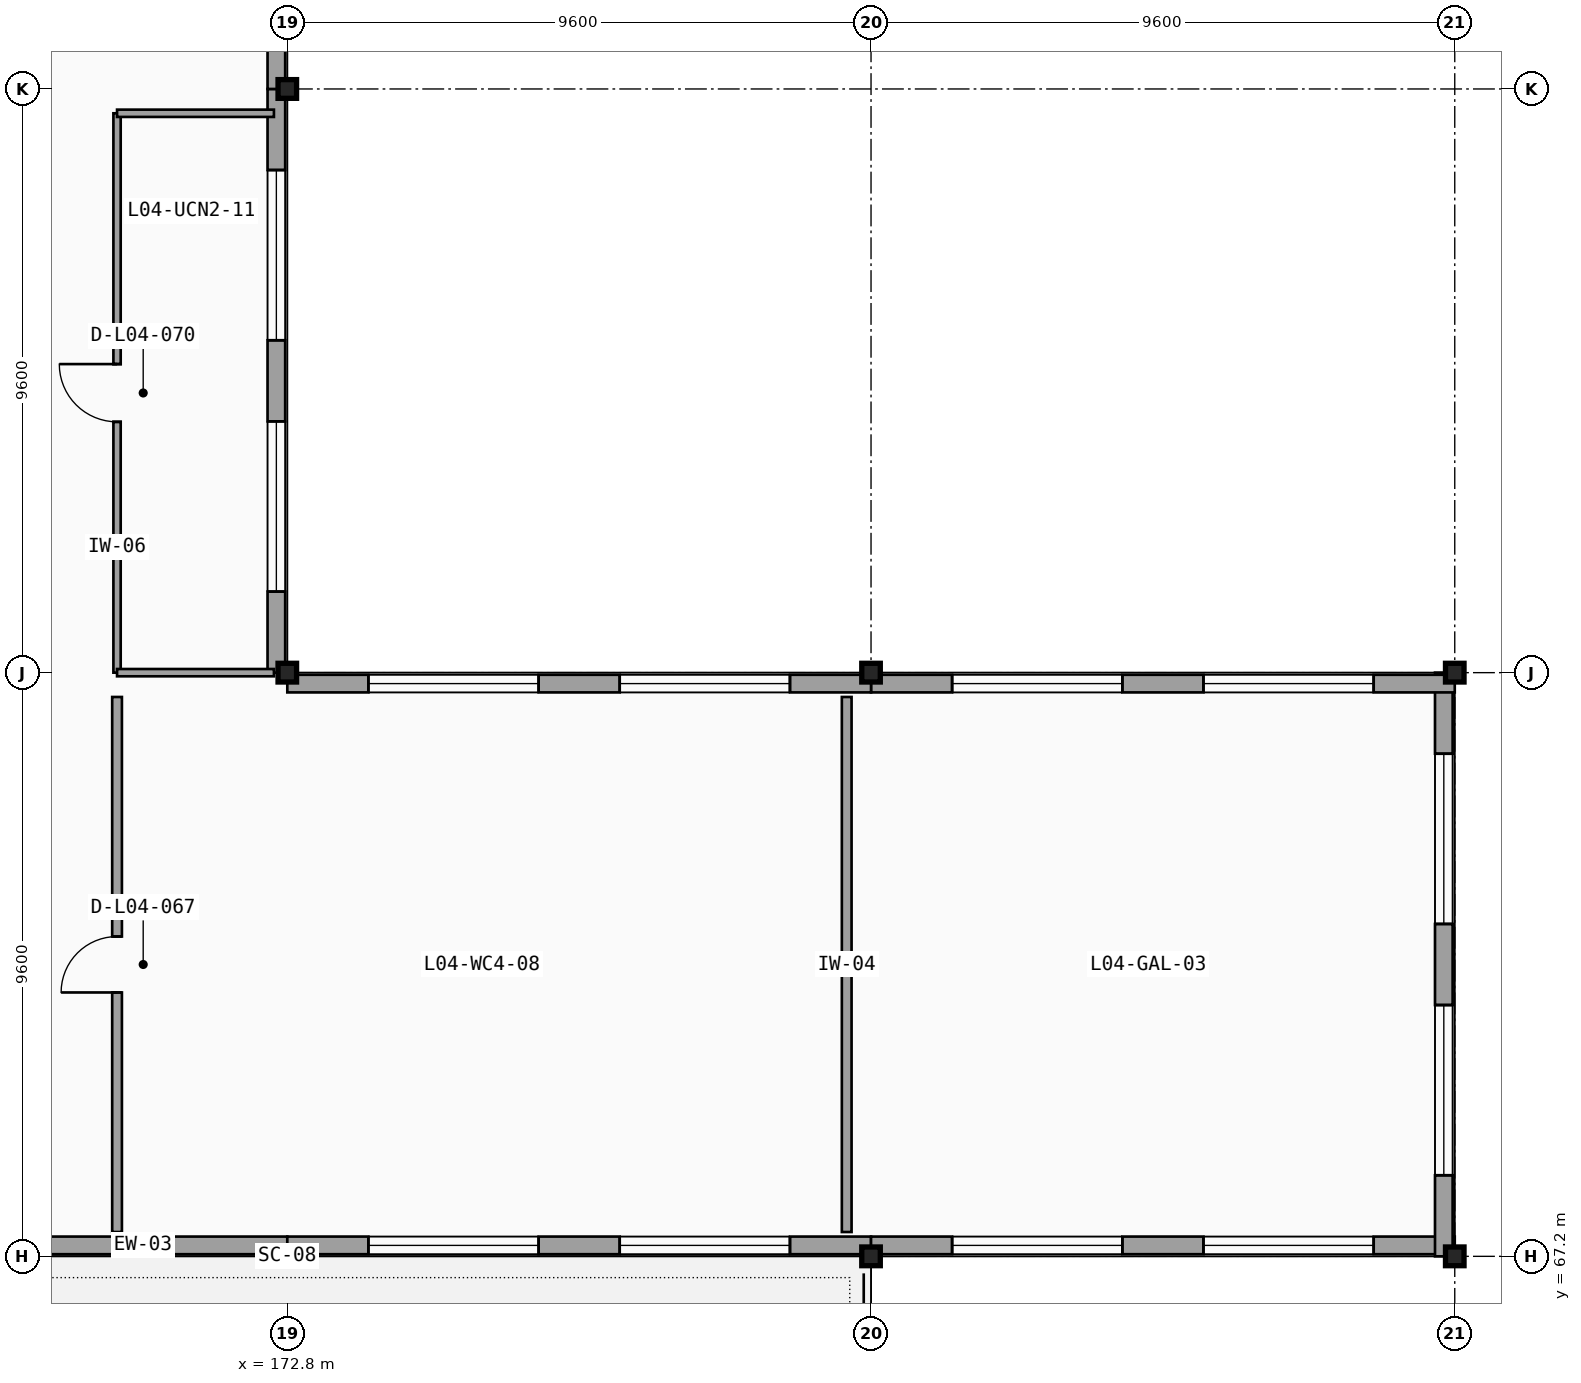
"""IFC4 building model, lengths in metres.
Left out: names, types, materials, properties, quantities, classifications, styles, units other than length and angle.
Written with IfcOpenShell. Run it as: python <this file> out.ifc"""

import sys

from ifc_helpers import new_model, si_unit, direction, frame, frame_2d, origin, origin_2d, place, context, subcontext, project, spatial, rectangle, i_section, extrude, element, fill, save


model = new_model("IFC4")
c1 = context("Model", 3, precision=1e-05, world=origin(), true_north=direction((0.0, 1.0)))
c2 = subcontext(c1, "Body", "Model", "MODEL_VIEW")
j1 = project(units=[si_unit("LENGTHUNIT", "METRE"), si_unit("PLANEANGLEUNIT", "RADIAN")], contexts=[c1])
p1 = place(None, origin())
s1 = spatial("IfcSite", under=j1, at=p1, CompositionType="ELEMENT")
p2 = place(p1, origin())
s2 = spatial("IfcBuilding", under=s1, at=p2, CompositionType="ELEMENT")
p3 = place(p2, frame((0.0, 0.0, 18.6)))
s3 = spatial("IfcBuildingStorey", under=s2, at=p3, CompositionType="ELEMENT", Elevation=18.6)
for number, where, z_axis, x_axis in (
    (1, (172.8, 67.2, 0.0), (0.0, 0.0, 1.0), (1.0, 0.0, 0.0)),
    (2, (172.8, 76.8, 0.0), (0.0, 0.0, 1.0), (1.0, 0.0, 0.0)),
    (3, (172.8, 86.4, 0.0), (0.0, 0.0, 1.0), (1.0, 0.0, 0.0)),
    (4, (182.4, 67.2, 0.0), (0.0, 0.0, 1.0), (1.0, 0.0, 0.0)),
    (5, (182.4, 76.8, 0.0), (0.0, 0.0, 1.0), (1.0, 0.0, 0.0)),
    (6, (192.0, 67.2, 0.0), (0.0, 0.0, 1.0), (1.0, 0.0, 0.0)),
    (7, (192.0, 76.8, 0.0), (0.0, 0.0, 1.0), (1.0, 0.0, 0.0)),
):
    element("IfcColumn", number, at=place(p3, frame(where, z_axis=z_axis, x_axis=x_axis)), inside=s3, PredefinedType="COLUMN", context=c2, shape_type="SweptSolid", body=[
        extrude(i_section(OverallWidth=0.305, OverallDepth=0.308, WebThickness=0.01, FlangeThickness=0.015, FilletRadius=0.013, at=origin_2d()), origin(), (0.0, 0.0, 1.0), 4.5),
    ])
p4 = place(p3, frame((164.28, 67.38, 0.0), z_axis=(0.0, 0.0, 1.0), x_axis=(1.0, 0.0, 0.0)))
e8 = element("IfcWall", 8, at=p4, inside=s3, PredefinedType="SOLIDWALL", context=c2, shape_type="SweptSolid", body=[
    extrude(rectangle(XDim=8.52, YDim=0.29, at=frame_2d((4.26, 0.0))), origin(), (0.0, 0.0, 1.0), 3.562),
])
p5 = place(p4, frame((3.773, 0.0, 0.95), z_axis=(0.0, 0.0, 1.0), x_axis=(-1.0, 0.0, 0.0)))
e9 = element("IfcOpeningElement", 9, at=p5, cuts=e8, PredefinedType="OPENING", context=c2, shape_type="SweptSolid", body=[
    extrude(rectangle(XDim=2.8, YDim=1.9, at=frame_2d((1.4, 0.95))), frame((0.0, 0.155, 0.0), z_axis=(0.0, -1.0, 0.0), x_axis=(1.0, 0.0, 0.0)), (0.0, 0.0, 1.0), 0.31),
])
p6 = place(p3, frame((172.8, 67.38, 0.0), z_axis=(0.0, 0.0, 1.0), x_axis=(1.0, 0.0, 0.0)))
e10 = element("IfcWall", 10, at=p6, inside=s3, PredefinedType="SOLIDWALL", context=c2, shape_type="SweptSolid", body=[
    extrude(rectangle(XDim=9.6, YDim=0.29, at=frame_2d((4.8, 0.0))), origin(), (0.0, 0.0, 1.0), 3.562),
])
p7 = place(p6, frame((4.133, 0.0, 0.95), z_axis=(0.0, 0.0, 1.0), x_axis=(-1.0, 0.0, 0.0)))
e11 = element("IfcOpeningElement", 11, at=p7, cuts=e10, PredefinedType="OPENING", context=c2, shape_type="SweptSolid", body=[
    extrude(rectangle(XDim=2.8, YDim=1.9, at=frame_2d((1.4, 0.95))), frame((0.0, 0.155, 0.0), z_axis=(0.0, -1.0, 0.0), x_axis=(1.0, 0.0, 0.0)), (0.0, 0.0, 1.0), 0.31),
])
p8 = place(p6, frame((8.267, 0.0, 0.95), z_axis=(0.0, 0.0, 1.0), x_axis=(-1.0, 0.0, 0.0)))
e12 = element("IfcOpeningElement", 12, at=p8, cuts=e10, PredefinedType="OPENING", context=c2, shape_type="SweptSolid", body=[
    extrude(rectangle(XDim=2.8, YDim=1.9, at=frame_2d((1.4, 0.95))), frame((0.0, 0.155, 0.0), z_axis=(0.0, -1.0, 0.0), x_axis=(1.0, 0.0, 0.0)), (0.0, 0.0, 1.0), 0.31),
])
p9 = place(p3, frame((182.4, 67.38, 0.0), z_axis=(0.0, 0.0, 1.0), x_axis=(1.0, 0.0, 0.0)))
e13 = element("IfcWall", 13, at=p9, inside=s3, PredefinedType="SOLIDWALL", context=c2, shape_type="SweptSolid", body=[
    extrude(rectangle(XDim=9.6, YDim=0.29, at=frame_2d((4.8, 0.0))), origin(), (0.0, 0.0, 1.0), 3.313),
])
p10 = place(p9, frame((4.133, 0.0, 0.95), z_axis=(0.0, 0.0, 1.0), x_axis=(-1.0, 0.0, 0.0)))
e14 = element("IfcOpeningElement", 14, at=p10, cuts=e13, PredefinedType="OPENING", context=c2, shape_type="SweptSolid", body=[
    extrude(rectangle(XDim=2.8, YDim=1.9, at=frame_2d((1.4, 0.95))), frame((0.0, 0.155, 0.0), z_axis=(0.0, -1.0, 0.0), x_axis=(1.0, 0.0, 0.0)), (0.0, 0.0, 1.0), 0.31),
])
p11 = place(p9, frame((8.267, 0.0, 0.95), z_axis=(0.0, 0.0, 1.0), x_axis=(-1.0, 0.0, 0.0)))
e15 = element("IfcOpeningElement", 15, at=p11, cuts=e13, PredefinedType="OPENING", context=c2, shape_type="SweptSolid", body=[
    extrude(rectangle(XDim=2.8, YDim=1.9, at=frame_2d((1.4, 0.95))), frame((0.0, 0.155, 0.0), z_axis=(0.0, -1.0, 0.0), x_axis=(1.0, 0.0, 0.0)), (0.0, 0.0, 1.0), 0.31),
])
p12 = place(p3, frame((191.82, 67.2, 0.0), z_axis=(0.0, 0.0, 1.0), x_axis=(0.0, 1.0, 0.0)))
e16 = element("IfcWall", 16, at=p12, inside=s3, PredefinedType="SOLIDWALL", context=c2, shape_type="SweptSolid", body=[
    extrude(rectangle(XDim=9.6, YDim=0.29, at=frame_2d((4.8, 0.0))), origin(), (0.0, 0.0, 1.0), 3.313),
])
p13 = place(p12, frame((4.133, 0.0, 0.95), z_axis=(0.0, 0.0, 1.0), x_axis=(-1.0, 0.0, 0.0)))
e17 = element("IfcOpeningElement", 17, at=p13, cuts=e16, PredefinedType="OPENING", context=c2, shape_type="SweptSolid", body=[
    extrude(rectangle(XDim=2.8, YDim=1.9, at=frame_2d((1.4, 0.95))), frame((0.0, 0.155, 0.0), z_axis=(0.0, -1.0, 0.0), x_axis=(1.0, 0.0, 0.0)), (0.0, 0.0, 1.0), 0.31),
])
p14 = place(p12, frame((8.267, 0.0, 0.95), z_axis=(0.0, 0.0, 1.0), x_axis=(-1.0, 0.0, 0.0)))
e18 = element("IfcOpeningElement", 18, at=p14, cuts=e16, PredefinedType="OPENING", context=c2, shape_type="SweptSolid", body=[
    extrude(rectangle(XDim=2.8, YDim=1.9, at=frame_2d((1.4, 0.95))), frame((0.0, 0.155, 0.0), z_axis=(0.0, -1.0, 0.0), x_axis=(1.0, 0.0, 0.0)), (0.0, 0.0, 1.0), 0.31),
])
p15 = place(p3, frame((192.0, 76.62, 0.0), z_axis=(0.0, 0.0, 1.0), x_axis=(-1.0, 0.0, 0.0)))
e19 = element("IfcWall", 19, at=p15, inside=s3, PredefinedType="SOLIDWALL", context=c2, shape_type="SweptSolid", body=[
    extrude(rectangle(XDim=9.6, YDim=0.29, at=frame_2d((4.8, 0.0))), origin(), (0.0, 0.0, 1.0), 3.313),
])
p16 = place(p15, frame((4.133, 0.0, 0.95), z_axis=(0.0, 0.0, 1.0), x_axis=(-1.0, 0.0, 0.0)))
e20 = element("IfcOpeningElement", 20, at=p16, cuts=e19, PredefinedType="OPENING", context=c2, shape_type="SweptSolid", body=[
    extrude(rectangle(XDim=2.8, YDim=1.9, at=frame_2d((1.4, 0.95))), frame((0.0, 0.155, 0.0), z_axis=(0.0, -1.0, 0.0), x_axis=(1.0, 0.0, 0.0)), (0.0, 0.0, 1.0), 0.31),
])
p17 = place(p15, frame((8.267, 0.0, 0.95), z_axis=(0.0, 0.0, 1.0), x_axis=(-1.0, 0.0, 0.0)))
e21 = element("IfcOpeningElement", 21, at=p17, cuts=e19, PredefinedType="OPENING", context=c2, shape_type="SweptSolid", body=[
    extrude(rectangle(XDim=2.8, YDim=1.9, at=frame_2d((1.4, 0.95))), frame((0.0, 0.155, 0.0), z_axis=(0.0, -1.0, 0.0), x_axis=(1.0, 0.0, 0.0)), (0.0, 0.0, 1.0), 0.31),
])
p18 = place(p3, frame((182.4, 76.62, 0.0), z_axis=(0.0, 0.0, 1.0), x_axis=(-1.0, 0.0, 0.0)))
e22 = element("IfcWall", 22, at=p18, inside=s3, PredefinedType="SOLIDWALL", context=c2, shape_type="SweptSolid", body=[
    extrude(rectangle(XDim=9.6, YDim=0.29, at=frame_2d((4.8, 0.0))), origin(), (0.0, 0.0, 1.0), 3.562),
])
p19 = place(p18, frame((4.133, 0.0, 0.95), z_axis=(0.0, 0.0, 1.0), x_axis=(-1.0, 0.0, 0.0)))
e23 = element("IfcOpeningElement", 23, at=p19, cuts=e22, PredefinedType="OPENING", context=c2, shape_type="SweptSolid", body=[
    extrude(rectangle(XDim=2.8, YDim=1.9, at=frame_2d((1.4, 0.95))), frame((0.0, 0.155, 0.0), z_axis=(0.0, -1.0, 0.0), x_axis=(1.0, 0.0, 0.0)), (0.0, 0.0, 1.0), 0.31),
])
p20 = place(p18, frame((8.267, 0.0, 0.95), z_axis=(0.0, 0.0, 1.0), x_axis=(-1.0, 0.0, 0.0)))
e24 = element("IfcOpeningElement", 24, at=p20, cuts=e22, PredefinedType="OPENING", context=c2, shape_type="SweptSolid", body=[
    extrude(rectangle(XDim=2.8, YDim=1.9, at=frame_2d((1.4, 0.95))), frame((0.0, 0.155, 0.0), z_axis=(0.0, -1.0, 0.0), x_axis=(1.0, 0.0, 0.0)), (0.0, 0.0, 1.0), 0.31),
])
p21 = place(p3, frame((172.62, 76.8, 0.0), z_axis=(0.0, 0.0, 1.0), x_axis=(0.0, 1.0, 0.0)))
e25 = element("IfcWall", 25, at=p21, inside=s3, PredefinedType="SOLIDWALL", context=c2, shape_type="SweptSolid", body=[
    extrude(rectangle(XDim=9.6, YDim=0.29, at=frame_2d((4.8, 0.0))), origin(), (0.0, 0.0, 1.0), 3.562),
])
p22 = place(p21, frame((4.133, 0.0, 0.95), z_axis=(0.0, 0.0, 1.0), x_axis=(-1.0, 0.0, 0.0)))
e26 = element("IfcOpeningElement", 26, at=p22, cuts=e25, PredefinedType="OPENING", context=c2, shape_type="SweptSolid", body=[
    extrude(rectangle(XDim=2.8, YDim=1.9, at=frame_2d((1.4, 0.95))), frame((0.0, 0.155, 0.0), z_axis=(0.0, -1.0, 0.0), x_axis=(1.0, 0.0, 0.0)), (0.0, 0.0, 1.0), 0.31),
])
p23 = place(p21, frame((8.267, 0.0, 0.95), z_axis=(0.0, 0.0, 1.0), x_axis=(-1.0, 0.0, 0.0)))
e27 = element("IfcOpeningElement", 27, at=p23, cuts=e25, PredefinedType="OPENING", context=c2, shape_type="SweptSolid", body=[
    extrude(rectangle(XDim=2.8, YDim=1.9, at=frame_2d((1.4, 0.95))), frame((0.0, 0.155, 0.0), z_axis=(0.0, -1.0, 0.0), x_axis=(1.0, 0.0, 0.0)), (0.0, 0.0, 1.0), 0.31),
])
p24 = place(p3, frame((172.62, 86.4, 0.0), z_axis=(0.0, 0.0, 1.0), x_axis=(0.0, 1.0, 0.0)))
e28 = element("IfcWall", 28, at=p24, inside=s3, PredefinedType="SOLIDWALL", context=c2, shape_type="SweptSolid", body=[
    extrude(rectangle(XDim=9.6, YDim=0.29, at=frame_2d((4.8, 0.0))), origin(), (0.0, 0.0, 1.0), 3.562),
])
p25 = place(p24, frame((4.133, 0.0, 0.95), z_axis=(0.0, 0.0, 1.0), x_axis=(-1.0, 0.0, 0.0)))
e29 = element("IfcOpeningElement", 29, at=p25, cuts=e28, PredefinedType="OPENING", context=c2, shape_type="SweptSolid", body=[
    extrude(rectangle(XDim=2.8, YDim=1.9, at=frame_2d((1.4, 0.95))), frame((0.0, 0.155, 0.0), z_axis=(0.0, -1.0, 0.0), x_axis=(1.0, 0.0, 0.0)), (0.0, 0.0, 1.0), 0.31),
])
p26 = place(p24, frame((8.267, 0.0, 0.95), z_axis=(0.0, 0.0, 1.0), x_axis=(-1.0, 0.0, 0.0)))
e30 = element("IfcOpeningElement", 30, at=p26, cuts=e28, PredefinedType="OPENING", context=c2, shape_type="SweptSolid", body=[
    extrude(rectangle(XDim=2.8, YDim=1.9, at=frame_2d((1.4, 0.95))), frame((0.0, 0.155, 0.0), z_axis=(0.0, -1.0, 0.0), x_axis=(1.0, 0.0, 0.0)), (0.0, 0.0, 1.0), 0.31),
])
p27 = place(p3, frame((182.0, 76.4, 0.0), z_axis=(0.0, 0.0, 1.0), x_axis=(0.0, -1.0, 0.0)))
e31 = element("IfcWall", 31, at=p27, inside=s3, PredefinedType="PARTITIONING", context=c2, shape_type="SweptSolid", body=[
    extrude(rectangle(XDim=8.8, YDim=0.16, at=frame_2d((4.4, 0.0))), origin(), (0.0, 0.0, 1.0), 3.836),
])
p28 = place(p3, frame((170.0, 67.6, 0.0), z_axis=(0.0, 0.0, 1.0), x_axis=(0.0, 1.0, 0.0)))
e32 = element("IfcWall", 32, at=p28, inside=s3, PredefinedType="PARTITIONING", context=c2, shape_type="SweptSolid", body=[
    extrude(rectangle(XDim=8.8, YDim=0.16, at=frame_2d((4.4, 0.0))), origin(), (0.0, 0.0, 1.0), 3.836),
])
p29 = place(p28, frame((3.94, 0.0, 0.0), z_axis=(0.0, 0.0, 1.0), x_axis=(1.0, 0.0, 0.0)))
e33 = element("IfcOpeningElement", 33, at=p29, cuts=e32, PredefinedType="OPENING", context=c2, shape_type="SweptSolid", body=[
    extrude(rectangle(XDim=0.92, YDim=2.12, at=frame_2d((0.46, 1.06))), frame((0.0, 0.09, 0.0), z_axis=(0.0, -1.0, 0.0), x_axis=(1.0, 0.0, 0.0)), (0.0, 0.0, 1.0), 0.18),
])
p30 = place(p3, frame((170.0, 76.8, 0.0), z_axis=(0.0, 0.0, 1.0), x_axis=(0.0, 1.0, 0.0)))
e34 = element("IfcWall", 34, at=p30, inside=s3, PredefinedType="PARTITIONING", context=c2, shape_type="SweptSolid", body=[
    extrude(rectangle(XDim=9.2, YDim=0.12, at=frame_2d((4.6, 0.0))), origin(), (0.0, 0.0, 1.0), 3.562),
])
p31 = place(p30, frame((4.125, 0.0, 0.0), z_axis=(0.0, 0.0, 1.0), x_axis=(1.0, 0.0, 0.0)))
e35 = element("IfcOpeningElement", 35, at=p31, cuts=e34, PredefinedType="OPENING", context=c2, shape_type="SweptSolid", body=[
    extrude(rectangle(XDim=0.95, YDim=2.15, at=frame_2d((0.475, 1.075))), frame((0.0, 0.07, 0.0), z_axis=(0.0, -1.0, 0.0), x_axis=(1.0, 0.0, 0.0)), (0.0, 0.0, 1.0), 0.14),
])
p32 = place(p3, frame((170.0, 86.0, 0.0), z_axis=(0.0, 0.0, 1.0), x_axis=(1.0, 0.0, 0.0)))
e36 = element("IfcWall", 36, at=p32, inside=s3, PredefinedType="PARTITIONING", context=c2, shape_type="SweptSolid", body=[
    extrude(rectangle(XDim=2.58, YDim=0.12, at=frame_2d((1.29, 0.0))), origin(), (0.0, 0.0, 1.0), 4.24),
])
p33 = place(p3, frame((172.58, 76.8, 0.0), z_axis=(0.0, 0.0, 1.0), x_axis=(-1.0, 0.0, 0.0)))
e37 = element("IfcWall", 37, at=p33, inside=s3, PredefinedType="PARTITIONING", context=c2, shape_type="SweptSolid", body=[
    extrude(rectangle(XDim=2.58, YDim=0.12, at=frame_2d((1.29, 0.0))), origin(), (0.0, 0.0, 1.0), 3.562),
])
p34 = place(p7, origin())
e38 = element("IfcWindow", 38, at=p34, inside=s3, PartitioningType="SINGLE_PANEL", PredefinedType="WINDOW", context=c2, shape_type="SweptSolid", body=[
    extrude(rectangle(XDim=2.8, YDim=1.9, at=frame_2d((1.4, 0.95))), frame((0.0, 0.03, 0.0), z_axis=(0.0, -1.0, 0.0), x_axis=(1.0, 0.0, 0.0)), (0.0, 0.0, 1.0), 0.06),
])
fill(e11, e38)
p35 = place(p8, origin())
e39 = element("IfcWindow", 39, at=p35, inside=s3, PartitioningType="SINGLE_PANEL", PredefinedType="WINDOW", context=c2, shape_type="SweptSolid", body=[
    extrude(rectangle(XDim=2.8, YDim=1.9, at=frame_2d((1.4, 0.95))), frame((0.0, 0.03, 0.0), z_axis=(0.0, -1.0, 0.0), x_axis=(1.0, 0.0, 0.0)), (0.0, 0.0, 1.0), 0.06),
])
fill(e12, e39)
p36 = place(p10, origin())
e40 = element("IfcWindow", 40, at=p36, inside=s3, PartitioningType="SINGLE_PANEL", PredefinedType="WINDOW", context=c2, shape_type="SweptSolid", body=[
    extrude(rectangle(XDim=2.8, YDim=1.9, at=frame_2d((1.4, 0.95))), frame((0.0, 0.03, 0.0), z_axis=(0.0, -1.0, 0.0), x_axis=(1.0, 0.0, 0.0)), (0.0, 0.0, 1.0), 0.06),
])
fill(e14, e40)
p37 = place(p11, origin())
e41 = element("IfcWindow", 41, at=p37, inside=s3, PartitioningType="SINGLE_PANEL", PredefinedType="WINDOW", context=c2, shape_type="SweptSolid", body=[
    extrude(rectangle(XDim=2.8, YDim=1.9, at=frame_2d((1.4, 0.95))), frame((0.0, 0.03, 0.0), z_axis=(0.0, -1.0, 0.0), x_axis=(1.0, 0.0, 0.0)), (0.0, 0.0, 1.0), 0.06),
])
fill(e15, e41)
p38 = place(p13, origin())
e42 = element("IfcWindow", 42, at=p38, inside=s3, PartitioningType="SINGLE_PANEL", PredefinedType="WINDOW", context=c2, shape_type="SweptSolid", body=[
    extrude(rectangle(XDim=2.8, YDim=1.9, at=frame_2d((1.4, 0.95))), frame((0.0, 0.03, 0.0), z_axis=(0.0, -1.0, 0.0), x_axis=(1.0, 0.0, 0.0)), (0.0, 0.0, 1.0), 0.06),
])
fill(e17, e42)
p39 = place(p14, origin())
e43 = element("IfcWindow", 43, at=p39, inside=s3, PartitioningType="SINGLE_PANEL", PredefinedType="WINDOW", context=c2, shape_type="SweptSolid", body=[
    extrude(rectangle(XDim=2.8, YDim=1.9, at=frame_2d((1.4, 0.95))), frame((0.0, 0.03, 0.0), z_axis=(0.0, -1.0, 0.0), x_axis=(1.0, 0.0, 0.0)), (0.0, 0.0, 1.0), 0.06),
])
fill(e18, e43)
p40 = place(p16, origin())
e44 = element("IfcWindow", 44, at=p40, inside=s3, PartitioningType="SINGLE_PANEL", PredefinedType="WINDOW", context=c2, shape_type="SweptSolid", body=[
    extrude(rectangle(XDim=2.8, YDim=1.9, at=frame_2d((1.4, 0.95))), frame((0.0, 0.03, 0.0), z_axis=(0.0, -1.0, 0.0), x_axis=(1.0, 0.0, 0.0)), (0.0, 0.0, 1.0), 0.06),
])
fill(e20, e44)
p41 = place(p17, origin())
e45 = element("IfcWindow", 45, at=p41, inside=s3, PartitioningType="SINGLE_PANEL", PredefinedType="WINDOW", context=c2, shape_type="SweptSolid", body=[
    extrude(rectangle(XDim=2.8, YDim=1.9, at=frame_2d((1.4, 0.95))), frame((0.0, 0.03, 0.0), z_axis=(0.0, -1.0, 0.0), x_axis=(1.0, 0.0, 0.0)), (0.0, 0.0, 1.0), 0.06),
])
fill(e21, e45)
p42 = place(p19, origin())
e46 = element("IfcWindow", 46, at=p42, inside=s3, PartitioningType="SINGLE_PANEL", PredefinedType="WINDOW", context=c2, shape_type="SweptSolid", body=[
    extrude(rectangle(XDim=2.8, YDim=1.9, at=frame_2d((1.4, 0.95))), frame((0.0, 0.03, 0.0), z_axis=(0.0, -1.0, 0.0), x_axis=(1.0, 0.0, 0.0)), (0.0, 0.0, 1.0), 0.06),
])
fill(e23, e46)
p43 = place(p20, origin())
e47 = element("IfcWindow", 47, at=p43, inside=s3, PartitioningType="SINGLE_PANEL", PredefinedType="WINDOW", context=c2, shape_type="SweptSolid", body=[
    extrude(rectangle(XDim=2.8, YDim=1.9, at=frame_2d((1.4, 0.95))), frame((0.0, 0.03, 0.0), z_axis=(0.0, -1.0, 0.0), x_axis=(1.0, 0.0, 0.0)), (0.0, 0.0, 1.0), 0.06),
])
fill(e24, e47)
p44 = place(p22, origin())
e48 = element("IfcWindow", 48, at=p44, inside=s3, PartitioningType="SINGLE_PANEL", PredefinedType="WINDOW", context=c2, shape_type="SweptSolid", body=[
    extrude(rectangle(XDim=2.8, YDim=1.9, at=frame_2d((1.4, 0.95))), frame((0.0, 0.03, 0.0), z_axis=(0.0, -1.0, 0.0), x_axis=(1.0, 0.0, 0.0)), (0.0, 0.0, 1.0), 0.06),
])
fill(e26, e48)
p45 = place(p23, origin())
e49 = element("IfcWindow", 49, at=p45, inside=s3, PartitioningType="SINGLE_PANEL", PredefinedType="WINDOW", context=c2, shape_type="SweptSolid", body=[
    extrude(rectangle(XDim=2.8, YDim=1.9, at=frame_2d((1.4, 0.95))), frame((0.0, 0.03, 0.0), z_axis=(0.0, -1.0, 0.0), x_axis=(1.0, 0.0, 0.0)), (0.0, 0.0, 1.0), 0.06),
])
fill(e27, e49)
p46 = place(p29, origin())
e50 = element("IfcDoor", 50, at=p46, inside=s3, OperationType="SINGLE_SWING_LEFT", PredefinedType="DOOR", context=c2, shape_type="SweptSolid", body=[
    extrude(rectangle(XDim=0.92, YDim=2.12, at=frame_2d((0.46, 1.06))), frame((0.0, 0.025, 0.0), z_axis=(0.0, -1.0, 0.0), x_axis=(1.0, 0.0, 0.0)), (0.0, 0.0, 1.0), 0.05),
])
fill(e33, e50)
p47 = place(p31, origin())
e51 = element("IfcDoor", 51, at=p47, inside=s3, OperationType="SINGLE_SWING_RIGHT", PredefinedType="DOOR", context=c2, shape_type="SweptSolid", body=[
    extrude(rectangle(XDim=0.95, YDim=2.15, at=frame_2d((0.475, 1.075))), frame((0.0, 0.025, 0.0), z_axis=(0.0, -1.0, 0.0), x_axis=(1.0, 0.0, 0.0)), (0.0, 0.0, 1.0), 0.05),
])
fill(e35, e51)
save(model, sys.argv[1])
